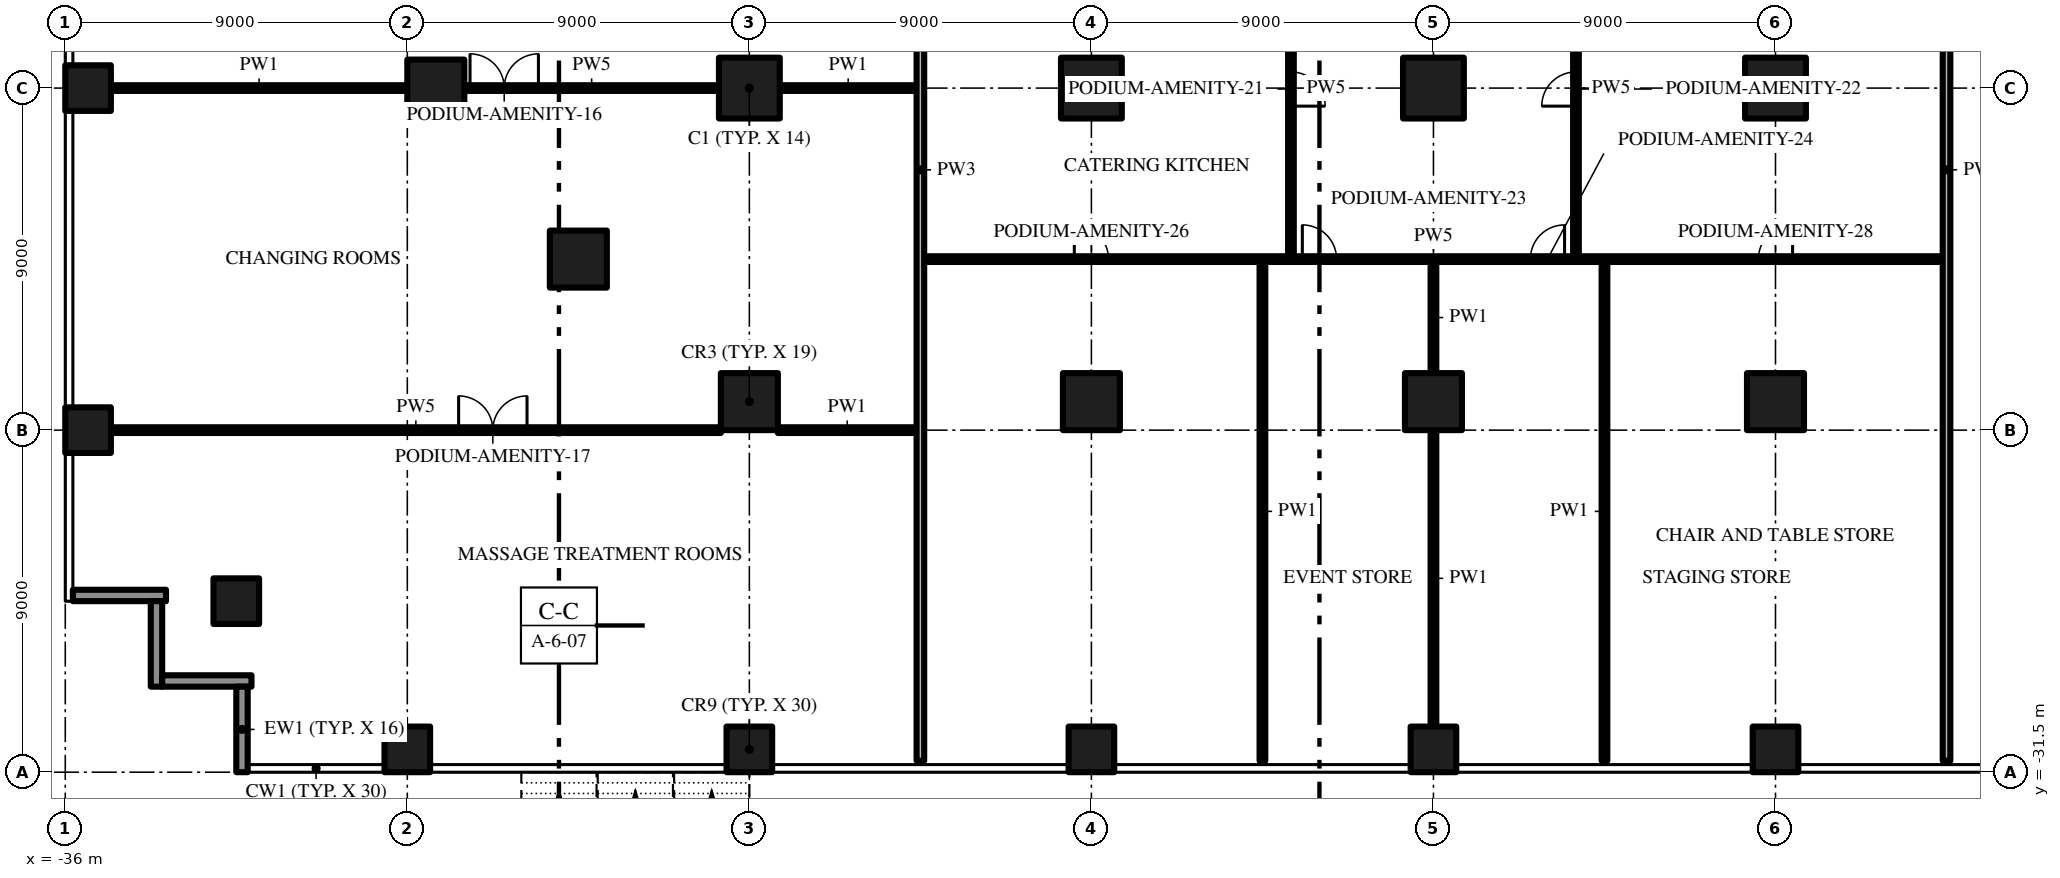
"""IFC4 building model, lengths in metres.
Left out: names, types, materials, properties, quantities, classifications, styles, units other than length and angle.
Written with IfcOpenShell. Run it as: python <this file> out.ifc"""

import sys

from ifc_helpers import new_model, si_unit, direction, frame, frame_2d, origin, origin_2d, place, context, subcontext, project, spatial, rectangle, extrude, element, fill, save


model = new_model("IFC4")
c1 = context("Model", 3, precision=1e-05, world=origin(), true_north=direction((0.0, 1.0)))
c2 = subcontext(c1, "Body", "Model", "MODEL_VIEW")
j1 = project(units=[si_unit("LENGTHUNIT", "METRE"), si_unit("PLANEANGLEUNIT", "RADIAN")], contexts=[c1])
p1 = place(None, origin())
s1 = spatial("IfcSite", under=j1, at=p1, CompositionType="ELEMENT")
p2 = place(p1, origin())
s2 = spatial("IfcBuilding", under=s1, at=p2, CompositionType="ELEMENT")
p3 = place(p2, frame((0.0, 0.0, 6.0)))
s3 = spatial("IfcBuildingStorey", under=s2, at=p3, CompositionType="ELEMENT", Elevation=6.0)
for number, where, z_axis, x_axis in (
    (1, (-18.0, -30.9, 0.0), (0.0, 0.0, 1.0), (1.0, 0.0, 0.0)),
    (2, (-27.0, -30.9, 0.0), (0.0, 0.0, 1.0), (1.0, 0.0, 0.0)),
    (3, (-35.4, -13.5, 0.0), (0.0, 0.0, 1.0), (1.0, 0.0, 0.0)),
    (4, (-35.4, -22.5, 0.0), (0.0, 0.0, 1.0), (1.0, 0.0, 0.0)),
    (5, (-31.5, -27.0, 0.0), (0.0, 0.0, 1.0), (1.0, 0.0, 0.0)),
    (6, (-9.0, -30.9, 0.0), (0.0, 0.0, 1.0), (1.0, 0.0, 0.0)),
    (7, (0.0, -30.9, 0.0), (0.0, 0.0, 1.0), (1.0, 0.0, 0.0)),
    (8, (9.0, -30.9, 0.0), (0.0, 0.0, 1.0), (1.0, 0.0, 0.0)),
):
    element("IfcColumn", number, at=place(p3, frame(where, z_axis=z_axis, x_axis=x_axis)), inside=s3, PredefinedType="COLUMN", context=c2, shape_type="SweptSolid", body=[
        extrude(rectangle(XDim=1.2, YDim=1.2, at=origin_2d()), origin(), (0.0, 0.0, 1.0), 4.15),
    ])
p4 = place(p3, frame((-18.0, -13.5, 0.0), z_axis=(0.0, 0.0, 1.0), x_axis=(1.0, 0.0, 0.0)))
e9 = element("IfcColumn", 9, at=p4, inside=s3, PredefinedType="COLUMN", context=c2, shape_type="SweptSolid", body=[
    extrude(rectangle(XDim=1.6, YDim=1.6, at=origin_2d()), origin(), (0.0, 0.0, 1.0), 4.15),
])
for number, where, z_axis, x_axis in (
    (10, (-18.0, -21.75, 0.0), (0.0, 0.0, 1.0), (1.0, 0.0, 0.0)),
    (11, (-26.25, -13.5, 0.0), (0.0, 0.0, 1.0), (1.0, 0.0, 0.0)),
    (12, (-22.5, -18.0, 0.0), (0.0, 0.0, 1.0), (1.0, 0.0, 0.0)),
):
    element("IfcColumn", number, at=place(p3, frame(where, z_axis=z_axis, x_axis=x_axis)), inside=s3, PredefinedType="COLUMN", context=c2, shape_type="SweptSolid", body=[
        extrude(rectangle(XDim=1.5, YDim=1.5, at=origin_2d()), origin(), (0.0, 0.0, 1.0), 4.15),
    ])
p5 = place(p3, frame((-9.0, -13.5, 0.0), z_axis=(0.0, 0.0, 1.0), x_axis=(1.0, 0.0, 0.0)))
e13 = element("IfcColumn", 13, at=p5, inside=s3, PredefinedType="COLUMN", context=c2, shape_type="SweptSolid", body=[
    extrude(rectangle(XDim=1.6, YDim=1.6, at=origin_2d()), origin(), (0.0, 0.0, 1.0), 4.15),
])
p6 = place(p3, frame((-9.0, -21.75, 0.0), z_axis=(0.0, 0.0, 1.0), x_axis=(1.0, 0.0, 0.0)))
e14 = element("IfcColumn", 14, at=p6, inside=s3, PredefinedType="COLUMN", context=c2, shape_type="SweptSolid", body=[
    extrude(rectangle(XDim=1.5, YDim=1.5, at=origin_2d()), origin(), (0.0, 0.0, 1.0), 4.15),
])
p7 = place(p3, frame((0.0, -13.5, 0.0), z_axis=(0.0, 0.0, 1.0), x_axis=(1.0, 0.0, 0.0)))
e15 = element("IfcColumn", 15, at=p7, inside=s3, PredefinedType="COLUMN", context=c2, shape_type="SweptSolid", body=[
    extrude(rectangle(XDim=1.6, YDim=1.6, at=origin_2d()), origin(), (0.0, 0.0, 1.0), 4.15),
])
p8 = place(p3, frame((0.0, -21.75, 0.0), z_axis=(0.0, 0.0, 1.0), x_axis=(1.0, 0.0, 0.0)))
e16 = element("IfcColumn", 16, at=p8, inside=s3, PredefinedType="COLUMN", context=c2, shape_type="SweptSolid", body=[
    extrude(rectangle(XDim=1.5, YDim=1.5, at=origin_2d()), origin(), (0.0, 0.0, 1.0), 4.15),
])
p9 = place(p3, frame((9.0, -13.5, 0.0), z_axis=(0.0, 0.0, 1.0), x_axis=(1.0, 0.0, 0.0)))
e17 = element("IfcColumn", 17, at=p9, inside=s3, PredefinedType="COLUMN", context=c2, shape_type="SweptSolid", body=[
    extrude(rectangle(XDim=1.6, YDim=1.6, at=origin_2d()), origin(), (0.0, 0.0, 1.0), 4.15),
])
p10 = place(p3, frame((9.0, -21.75, 0.0), z_axis=(0.0, 0.0, 1.0), x_axis=(1.0, 0.0, 0.0)))
e18 = element("IfcColumn", 18, at=p10, inside=s3, PredefinedType="COLUMN", context=c2, shape_type="SweptSolid", body=[
    extrude(rectangle(XDim=1.5, YDim=1.5, at=origin_2d()), origin(), (0.0, 0.0, 1.0), 4.15),
])
p11 = place(p3, frame((-33.35, -26.85, 0.0), z_axis=(0.0, 0.0, 1.0), x_axis=(-1.0, 0.0, 0.0)))
e19 = element("IfcWall", 19, at=p11, inside=s3, PredefinedType="SOLIDWALL", context=c2, shape_type="SweptSolid", body=[
    extrude(rectangle(XDim=2.45, YDim=0.3, at=frame_2d((1.225, 0.0))), origin(), (0.0, 0.0, 1.0), 4.15),
])
p12 = place(p3, frame((-33.6, -29.25, 0.0), z_axis=(0.0, 0.0, 1.0), x_axis=(0.0, 1.0, 0.0)))
e20 = element("IfcWall", 20, at=p12, inside=s3, PredefinedType="SOLIDWALL", context=c2, shape_type="SweptSolid", body=[
    extrude(rectangle(XDim=2.25, YDim=0.3, at=frame_2d((1.125, 0.0))), origin(), (0.0, 0.0, 1.0), 4.15),
])
p13 = place(p3, frame((-31.1, -29.1, 0.0), z_axis=(0.0, 0.0, 1.0), x_axis=(-1.0, 0.0, 0.0)))
e21 = element("IfcWall", 21, at=p13, inside=s3, PredefinedType="SOLIDWALL", context=c2, shape_type="SweptSolid", body=[
    extrude(rectangle(XDim=2.35, YDim=0.3, at=frame_2d((1.175, 0.0))), origin(), (0.0, 0.0, 1.0), 4.15),
])
p14 = place(p3, frame((-31.35, -31.5, 0.0), z_axis=(0.0, 0.0, 1.0), x_axis=(0.0, 1.0, 0.0)))
e22 = element("IfcWall", 22, at=p14, inside=s3, PredefinedType="SOLIDWALL", context=c2, shape_type="SweptSolid", body=[
    extrude(rectangle(XDim=2.25, YDim=0.3, at=frame_2d((1.125, 0.0))), origin(), (0.0, 0.0, 1.0), 4.15),
])
p15 = place(p3, frame((-34.8, -22.5, 0.0), z_axis=(0.0, 0.0, 1.0), x_axis=(1.0, 0.0, 0.0)))
e23 = element("IfcWall", 23, at=p15, inside=s3, PredefinedType="PARTITIONING", context=c2, shape_type="SweptSolid", body=[
    extrude(rectangle(XDim=16.05, YDim=0.15, at=frame_2d((8.025, 0.0))), origin(), (0.0, 0.0, 1.0), 4.15),
])
p16 = place(p15, frame((9.15, 0.0, 0.0)))
e24 = element("IfcOpeningElement", 24, at=p16, cuts=e23, PredefinedType="OPENING", context=c2, shape_type="SweptSolid", body=[
    extrude(rectangle(XDim=1.8, YDim=2.4, at=frame_2d((0.9, 1.2))), frame((0.0, 0.085, 0.0), z_axis=(0.0, -1.0, 0.0), x_axis=(1.0, 0.0, 0.0)), (0.0, 0.0, 1.0), 0.17),
])
p17 = place(p3, frame((-17.25, -22.5, 0.0), z_axis=(0.0, 0.0, 1.0), x_axis=(1.0, 0.0, 0.0)))
e25 = element("IfcWall", 25, at=p17, inside=s3, PredefinedType="PARTITIONING", context=c2, shape_type="SweptSolid", body=[
    extrude(rectangle(XDim=3.65, YDim=0.15, at=frame_2d((1.825, 0.0))), origin(), (0.0, 0.0, 1.0), 4.15),
])
p18 = place(p3, frame((-13.4, -18.0, 0.0), z_axis=(0.0, 0.0, 1.0), x_axis=(1.0, 0.0, 0.0)))
e26 = element("IfcWall", 26, at=p18, inside=s3, PredefinedType="PARTITIONING", context=c2, shape_type="SweptSolid", body=[
    extrude(rectangle(XDim=26.8, YDim=0.15, at=frame_2d((13.4, 0.0))), origin(), (0.0, 0.0, 1.0), 4.15),
])
p19 = place(p18, frame((9.95, 0.0, 0.0)))
e27 = element("IfcOpeningElement", 27, at=p19, cuts=e26, PredefinedType="OPENING", context=c2, shape_type="SweptSolid", body=[
    extrude(rectangle(XDim=0.9, YDim=2.1, at=frame_2d((0.45, 1.05))), frame((0.0, 0.085, 0.0), z_axis=(0.0, -1.0, 0.0), x_axis=(1.0, 0.0, 0.0)), (0.0, 0.0, 1.0), 0.17),
])
p20 = place(p18, frame((15.95, 0.0, 0.0)))
e28 = element("IfcOpeningElement", 28, at=p20, cuts=e26, PredefinedType="OPENING", context=c2, shape_type="SweptSolid", body=[
    extrude(rectangle(XDim=0.9, YDim=2.1, at=frame_2d((0.45, 1.05))), frame((0.0, 0.085, 0.0), z_axis=(0.0, -1.0, 0.0), x_axis=(1.0, 0.0, 0.0)), (0.0, 0.0, 1.0), 0.17),
])
p21 = place(p18, frame((3.95, 0.0, 0.0)))
e29 = element("IfcOpeningElement", 29, at=p21, cuts=e26, PredefinedType="OPENING", context=c2, shape_type="SweptSolid", body=[
    extrude(rectangle(XDim=0.9, YDim=2.1, at=frame_2d((0.45, 1.05))), frame((0.0, 0.085, 0.0), z_axis=(0.0, -1.0, 0.0), x_axis=(1.0, 0.0, 0.0)), (0.0, 0.0, 1.0), 0.17),
])
p22 = place(p18, frame((21.95, 0.0, 0.0)))
e30 = element("IfcOpeningElement", 30, at=p22, cuts=e26, PredefinedType="OPENING", context=c2, shape_type="SweptSolid", body=[
    extrude(rectangle(XDim=0.9, YDim=2.1, at=frame_2d((0.45, 1.05))), frame((0.0, 0.085, 0.0), z_axis=(0.0, -1.0, 0.0), x_axis=(1.0, 0.0, 0.0)), (0.0, 0.0, 1.0), 0.17),
])
p23 = place(p3, frame((-34.8, -13.5, 0.0), z_axis=(0.0, 0.0, 1.0), x_axis=(1.0, 0.0, 0.0)))
e31 = element("IfcWall", 31, at=p23, inside=s3, PredefinedType="PARTITIONING", context=c2, shape_type="SweptSolid", body=[
    extrude(rectangle(XDim=7.8, YDim=0.15, at=frame_2d((3.9, 0.0))), origin(), (0.0, 0.0, 1.0), 4.15),
])
p24 = place(p3, frame((-25.5, -13.5, 0.0), z_axis=(0.0, 0.0, 1.0), x_axis=(1.0, 0.0, 0.0)))
e32 = element("IfcWall", 32, at=p24, inside=s3, PredefinedType="PARTITIONING", context=c2, shape_type="SweptSolid", body=[
    extrude(rectangle(XDim=6.7, YDim=0.15, at=frame_2d((3.35, 0.0))), origin(), (0.0, 0.0, 1.0), 4.15),
])
p25 = place(p24, frame((0.15, 0.0, 0.0)))
e33 = element("IfcOpeningElement", 33, at=p25, cuts=e32, PredefinedType="OPENING", context=c2, shape_type="SweptSolid", body=[
    extrude(rectangle(XDim=1.8, YDim=2.4, at=frame_2d((0.9, 1.2))), frame((0.0, 0.085, 0.0), z_axis=(0.0, -1.0, 0.0), x_axis=(1.0, 0.0, 0.0)), (0.0, 0.0, 1.0), 0.17),
])
p26 = place(p3, frame((-17.2, -13.5, 0.0), z_axis=(0.0, 0.0, 1.0), x_axis=(1.0, 0.0, 0.0)))
e34 = element("IfcWall", 34, at=p26, inside=s3, PredefinedType="PARTITIONING", context=c2, shape_type="SweptSolid", body=[
    extrude(rectangle(XDim=3.6, YDim=0.15, at=frame_2d((1.8, 0.0))), origin(), (0.0, 0.0, 1.0), 4.15),
])
p27 = place(p3, frame((-13.5, -31.2, 0.0), z_axis=(0.0, 0.0, 1.0), x_axis=(0.0, 1.0, 0.0)))
e35 = element("IfcWall", 35, at=p27, inside=s3, PredefinedType="PARTITIONING", context=c2, shape_type="SweptSolid", body=[
    extrude(rectangle(XDim=31.1, YDim=0.2, at=frame_2d((15.55, 0.0))), origin(), (0.0, 0.0, 1.0), 4.15),
])
p28 = place(p3, frame((-4.5, -31.2, 0.0), z_axis=(0.0, 0.0, 1.0), x_axis=(0.0, 1.0, 0.0)))
e36 = element("IfcWall", 36, at=p28, inside=s3, PredefinedType="PARTITIONING", context=c2, shape_type="SweptSolid", body=[
    extrude(rectangle(XDim=13.125, YDim=0.15, at=frame_2d((6.562, 0.0))), origin(), (0.0, 0.0, 1.0), 4.15),
])
p29 = place(p3, frame((-3.75, -9.075, 0.0), z_axis=(0.0, 0.0, 1.0), x_axis=(0.0, -1.0, 0.0)))
e37 = element("IfcWall", 37, at=p29, inside=s3, PredefinedType="PARTITIONING", context=c2, shape_type="SweptSolid", body=[
    extrude(rectangle(XDim=8.85, YDim=0.15, at=frame_2d((4.425, 0.0))), origin(), (0.0, 0.0, 1.0), 4.15),
])
p30 = place(p29, frame((4.0, 0.0, 0.0)))
e38 = element("IfcOpeningElement", 38, at=p30, cuts=e37, PredefinedType="OPENING", context=c2, shape_type="SweptSolid", body=[
    extrude(rectangle(XDim=0.9, YDim=2.1, at=frame_2d((0.45, 1.05))), frame((0.0, 0.085, 0.0), z_axis=(0.0, -1.0, 0.0), x_axis=(1.0, 0.0, 0.0)), (0.0, 0.0, 1.0), 0.17),
])
p31 = place(p3, frame((0.0, -30.3, 0.0), z_axis=(0.0, 0.0, 1.0), x_axis=(0.0, 1.0, 0.0)))
e39 = element("IfcWall", 39, at=p31, inside=s3, PredefinedType="PARTITIONING", context=c2, shape_type="SweptSolid", body=[
    extrude(rectangle(XDim=7.8, YDim=0.15, at=frame_2d((3.9, 0.0))), origin(), (0.0, 0.0, 1.0), 4.15),
])
p32 = place(p3, frame((0.0, -21.0, 0.0), z_axis=(0.0, 0.0, 1.0), x_axis=(0.0, 1.0, 0.0)))
e40 = element("IfcWall", 40, at=p32, inside=s3, PredefinedType="PARTITIONING", context=c2, shape_type="SweptSolid", body=[
    extrude(rectangle(XDim=2.925, YDim=0.15, at=frame_2d((1.462, 0.0))), origin(), (0.0, 0.0, 1.0), 4.15),
])
p33 = place(p3, frame((3.75, -17.925, 0.0), z_axis=(0.0, 0.0, 1.0), x_axis=(0.0, 1.0, 0.0)))
e41 = element("IfcWall", 41, at=p33, inside=s3, PredefinedType="PARTITIONING", context=c2, shape_type="SweptSolid", body=[
    extrude(rectangle(XDim=8.85, YDim=0.15, at=frame_2d((4.425, 0.0))), origin(), (0.0, 0.0, 1.0), 4.15),
])
p34 = place(p33, frame((3.95, 0.0, 0.0)))
e42 = element("IfcOpeningElement", 42, at=p34, cuts=e41, PredefinedType="OPENING", context=c2, shape_type="SweptSolid", body=[
    extrude(rectangle(XDim=0.9, YDim=2.1, at=frame_2d((0.45, 1.05))), frame((0.0, 0.085, 0.0), z_axis=(0.0, -1.0, 0.0), x_axis=(1.0, 0.0, 0.0)), (0.0, 0.0, 1.0), 0.17),
])
p35 = place(p3, frame((4.5, -31.2, 0.0), z_axis=(0.0, 0.0, 1.0), x_axis=(0.0, 1.0, 0.0)))
e43 = element("IfcWall", 43, at=p35, inside=s3, PredefinedType="PARTITIONING", context=c2, shape_type="SweptSolid", body=[
    extrude(rectangle(XDim=13.125, YDim=0.15, at=frame_2d((6.562, 0.0))), origin(), (0.0, 0.0, 1.0), 4.15),
])
p36 = place(p3, frame((13.5, -31.2, 0.0), z_axis=(0.0, 0.0, 1.0), x_axis=(0.0, 1.0, 0.0)))
e44 = element("IfcWall", 44, at=p36, inside=s3, PredefinedType="PARTITIONING", context=c2, shape_type="SweptSolid", body=[
    extrude(rectangle(XDim=31.1, YDim=0.2, at=frame_2d((15.55, 0.0))), origin(), (0.0, 0.0, 1.0), 4.15),
])
p37 = place(p25, origin())
e45 = element("IfcDoor", 45, at=p37, inside=s3, OperationType="DOUBLE_DOOR_SINGLE_SWING", PredefinedType="DOOR", context=c2, shape_type="SweptSolid", body=[
    extrude(rectangle(XDim=1.8, YDim=2.4, at=frame_2d((0.9, 1.2))), frame((0.0, 0.025, 0.0), z_axis=(0.0, -1.0, 0.0), x_axis=(1.0, 0.0, 0.0)), (0.0, 0.0, 1.0), 0.05),
])
fill(e33, e45)
p38 = place(p16, origin())
e46 = element("IfcDoor", 46, at=p38, inside=s3, OperationType="DOUBLE_DOOR_SINGLE_SWING", PredefinedType="DOOR", context=c2, shape_type="SweptSolid", body=[
    extrude(rectangle(XDim=1.8, YDim=2.4, at=frame_2d((0.9, 1.2))), frame((0.0, 0.025, 0.0), z_axis=(0.0, -1.0, 0.0), x_axis=(1.0, 0.0, 0.0)), (0.0, 0.0, 1.0), 0.05),
])
fill(e24, e46)
p39 = place(p30, origin())
e47 = element("IfcDoor", 47, at=p39, inside=s3, OperationType="SINGLE_SWING_RIGHT", PredefinedType="DOOR", context=c2, shape_type="SweptSolid", body=[
    extrude(rectangle(XDim=0.9, YDim=2.1, at=frame_2d((0.45, 1.05))), frame((0.0, 0.025, 0.0), z_axis=(0.0, -1.0, 0.0), x_axis=(1.0, 0.0, 0.0)), (0.0, 0.0, 1.0), 0.05),
])
fill(e38, e47)
p40 = place(p34, origin())
e48 = element("IfcDoor", 48, at=p40, inside=s3, OperationType="SINGLE_SWING_LEFT", PredefinedType="DOOR", context=c2, shape_type="SweptSolid", body=[
    extrude(rectangle(XDim=0.9, YDim=2.1, at=frame_2d((0.45, 1.05))), frame((0.0, 0.025, 0.0), z_axis=(0.0, -1.0, 0.0), x_axis=(1.0, 0.0, 0.0)), (0.0, 0.0, 1.0), 0.05),
])
fill(e42, e48)
p41 = place(p19, origin())
e49 = element("IfcDoor", 49, at=p41, inside=s3, OperationType="SINGLE_SWING_LEFT", PredefinedType="DOOR", context=c2, shape_type="SweptSolid", body=[
    extrude(rectangle(XDim=0.9, YDim=2.1, at=frame_2d((0.45, 1.05))), frame((0.0, 0.025, 0.0), z_axis=(0.0, -1.0, 0.0), x_axis=(1.0, 0.0, 0.0)), (0.0, 0.0, 1.0), 0.05),
])
fill(e27, e49)
p42 = place(p20, origin())
e50 = element("IfcDoor", 50, at=p42, inside=s3, OperationType="SINGLE_SWING_RIGHT", PredefinedType="DOOR", context=c2, shape_type="SweptSolid", body=[
    extrude(rectangle(XDim=0.9, YDim=2.1, at=frame_2d((0.45, 1.05))), frame((0.0, 0.025, 0.0), z_axis=(0.0, -1.0, 0.0), x_axis=(1.0, 0.0, 0.0)), (0.0, 0.0, 1.0), 0.05),
])
fill(e28, e50)
p43 = place(p21, origin())
e51 = element("IfcDoor", 51, at=p43, inside=s3, OperationType="SINGLE_SWING_LEFT", PredefinedType="DOOR", context=c2, shape_type="SweptSolid", body=[
    extrude(rectangle(XDim=0.9, YDim=2.1, at=frame_2d((0.45, 1.05))), frame((0.0, 0.025, 0.0), z_axis=(0.0, -1.0, 0.0), x_axis=(1.0, 0.0, 0.0)), (0.0, 0.0, 1.0), 0.05),
])
fill(e29, e51)
p44 = place(p22, origin())
e52 = element("IfcDoor", 52, at=p44, inside=s3, OperationType="SINGLE_SWING_RIGHT", PredefinedType="DOOR", context=c2, shape_type="SweptSolid", body=[
    extrude(rectangle(XDim=0.9, YDim=2.1, at=frame_2d((0.45, 1.05))), frame((0.0, 0.025, 0.0), z_axis=(0.0, -1.0, 0.0), x_axis=(1.0, 0.0, 0.0)), (0.0, 0.0, 1.0), 0.05),
])
fill(e30, e52)
save(model, sys.argv[1])
